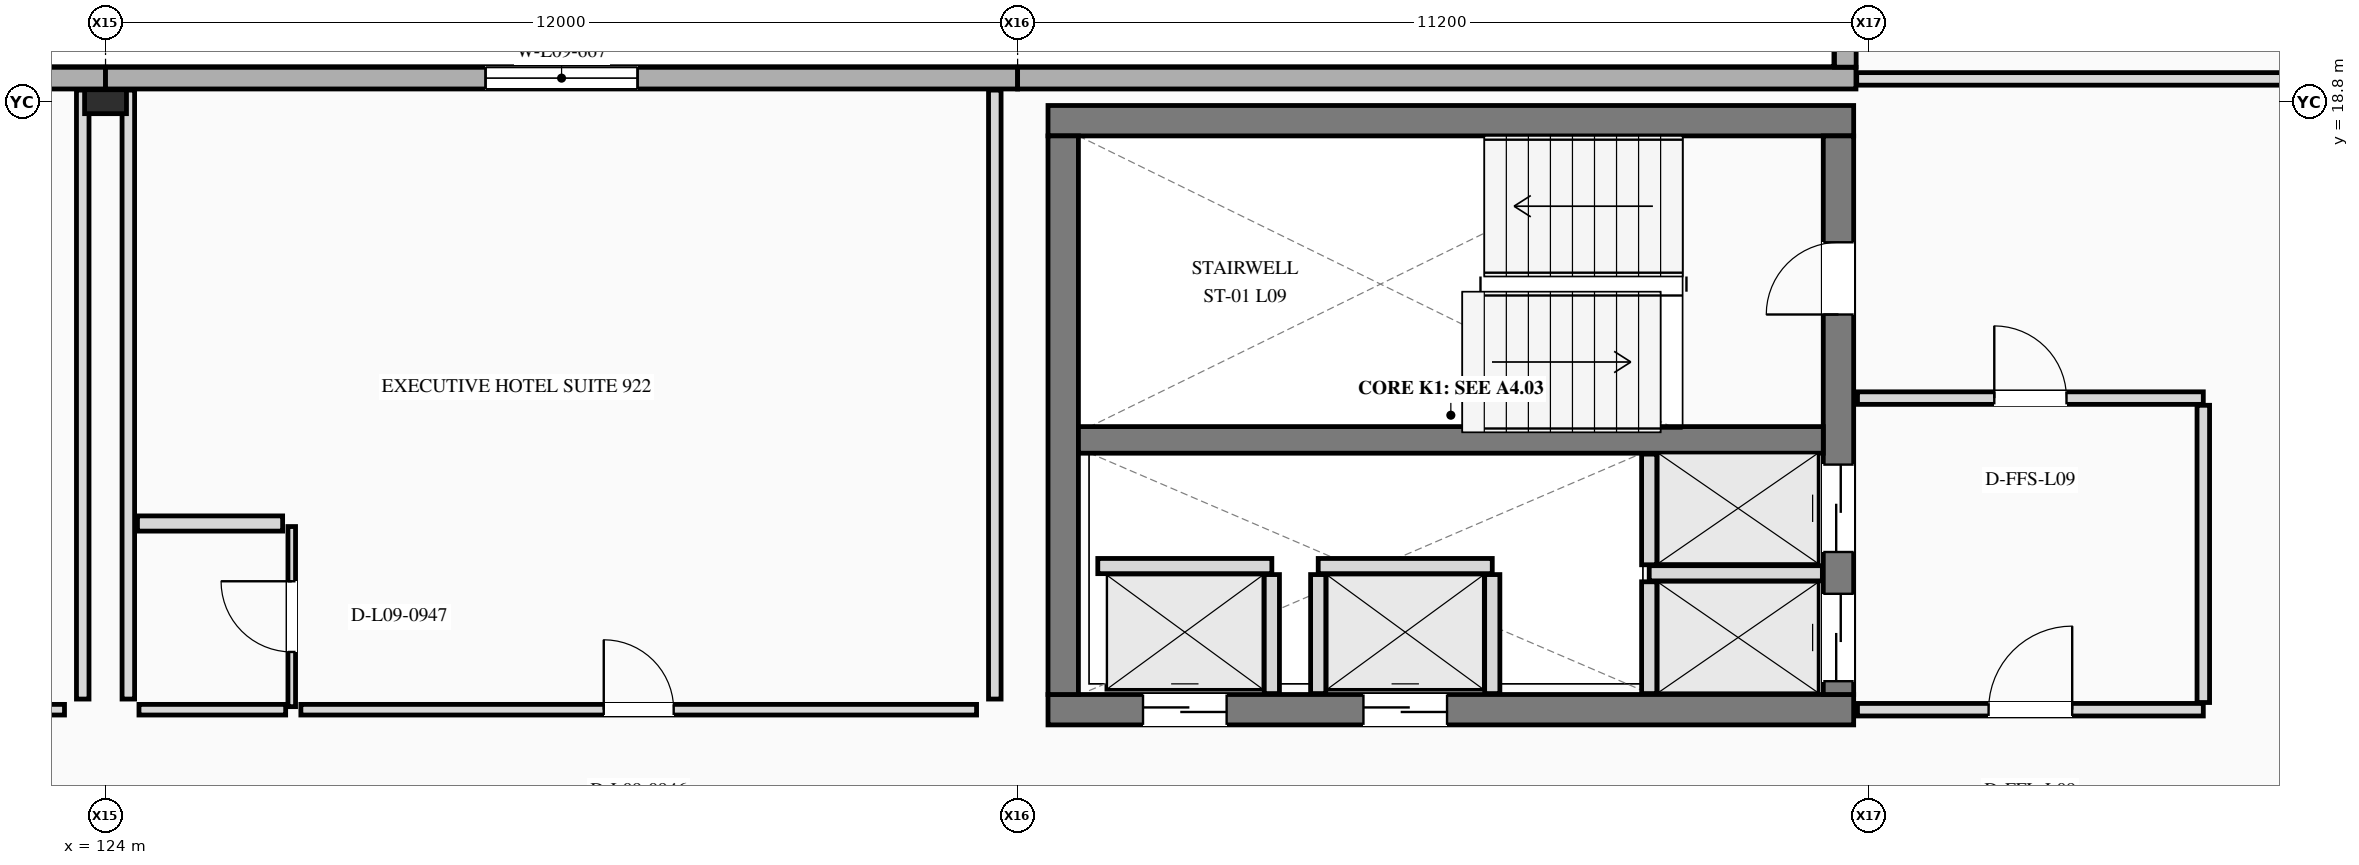
"""IFC4 building model, lengths in metres.
Left out: names, types, materials, properties, quantities, classifications, styles, units other than length and angle.
Written with IfcOpenShell. Run it as: python <this file> out.ifc"""

import sys

from ifc_helpers import new_model, si_unit, direction, frame, frame_2d, origin, origin_2d, place, context, subcontext, project, spatial, rectangle, i_section, extrude, element, fill, save


model = new_model("IFC4")
c1 = context("Model", 3, precision=1e-05, world=origin(), true_north=direction((0.0, 1.0)))
c2 = subcontext(c1, "Body", "Model", "MODEL_VIEW")
j1 = project(units=[si_unit("LENGTHUNIT", "METRE"), si_unit("PLANEANGLEUNIT", "RADIAN")], contexts=[c1])
p1 = place(None, origin())
s1 = spatial("IfcSite", under=j1, at=p1, CompositionType="ELEMENT")
p2 = place(p1, origin())
s2 = spatial("IfcBuilding", under=s1, at=p2, CompositionType="ELEMENT")
p3 = place(p2, frame((0.0, 0.0, 37.6)))
s3 = spatial("IfcBuildingStorey", under=s2, at=p3, CompositionType="ELEMENT", Elevation=37.6)
p4 = place(p3, frame((124.0, 18.8, 0.0), z_axis=(0.0, 0.0, 1.0), x_axis=(0.0, 1.0, 0.0)))
e1 = element("IfcColumn", 1, at=p4, inside=s3, PredefinedType="COLUMN", context=c2, shape_type="SweptSolid", body=[
    extrude(i_section(OverallWidth=0.315, OverallDepth=0.551, WebThickness=0.015, FlangeThickness=0.024, at=origin_2d()), origin(), (0.0, 0.0, 1.0), 3.5),
])
p5 = place(p3, frame((124.0, 19.11, 0.0), z_axis=(0.0, 0.0, 1.0), x_axis=(-1.0, 0.0, 0.0)))
e2 = element("IfcWall", 2, at=p5, inside=s3, PredefinedType="STANDARD", context=c2, shape_type="SweptSolid", body=[
    extrude(rectangle(XDim=12.0, YDim=0.285, at=frame_2d((6.0, 0.0))), origin(), (0.0, 0.0, 1.0), 3.5),
])
p6 = place(p5, frame((5.0, 0.0, 0.85)))
e3 = element("IfcOpeningElement", 3, at=p6, cuts=e2, PredefinedType="OPENING", context=c2, shape_type="SweptSolid", body=[
    extrude(rectangle(XDim=2.0, YDim=1.65, at=frame_2d((1.0, 0.825))), frame((0.0, 0.152, 0.0), z_axis=(0.0, -1.0, 0.0), x_axis=(1.0, 0.0, 0.0)), (0.0, 0.0, 1.0), 0.305),
])
p7 = place(p3, frame((136.0, 19.11, 0.0), z_axis=(0.0, 0.0, 1.0), x_axis=(-1.0, 0.0, 0.0)))
e4 = element("IfcWall", 4, at=p7, inside=s3, PredefinedType="STANDARD", context=c2, shape_type="SweptSolid", body=[
    extrude(rectangle(XDim=12.0, YDim=0.285, at=frame_2d((6.0, 0.0))), origin(), (0.0, 0.0, 1.0), 3.5),
])
p8 = place(p7, frame((5.0, 0.0, 0.85)))
e5 = element("IfcOpeningElement", 5, at=p8, cuts=e4, PredefinedType="OPENING", context=c2, shape_type="SweptSolid", body=[
    extrude(rectangle(XDim=2.0, YDim=1.65, at=frame_2d((1.0, 0.825))), frame((0.0, 0.152, 0.0), z_axis=(0.0, -1.0, 0.0), x_axis=(1.0, 0.0, 0.0)), (0.0, 0.0, 1.0), 0.305),
])
p9 = place(p3, frame((147.03, 19.11, 0.0), z_axis=(0.0, 0.0, 1.0), x_axis=(-1.0, 0.0, 0.0)))
e6 = element("IfcWall", 6, at=p9, inside=s3, PredefinedType="STANDARD", context=c2, shape_type="SweptSolid", body=[
    extrude(rectangle(XDim=11.03, YDim=0.285, at=frame_2d((5.515, 0.0))), origin(), (0.0, 0.0, 1.0), 3.5),
])
p10 = place(p3, frame((146.89, 19.254, 0.0), z_axis=(0.0, 0.0, 1.0), x_axis=(0.0, 1.0, 0.0)))
e7 = element("IfcWall", 7, at=p10, inside=s3, PredefinedType="STANDARD", context=c2, shape_type="SweptSolid", body=[
    extrude(rectangle(XDim=5.546, YDim=0.285, at=frame_2d((2.773, 0.0))), origin(), (0.0, 0.0, 1.0), 3.5),
])
p11 = place(p10, frame((1.598, 0.0, 0.85)))
e8 = element("IfcOpeningElement", 8, at=p11, cuts=e7, PredefinedType="OPENING", context=c2, shape_type="SweptSolid", body=[
    extrude(rectangle(XDim=2.0, YDim=1.65, at=frame_2d((1.0, 0.825))), frame((0.0, 0.152, 0.0), z_axis=(0.0, -1.0, 0.0), x_axis=(1.0, 0.0, 0.0)), (0.0, 0.0, 1.0), 0.305),
])
p12 = place(p3, frame((136.4, 10.8, 0.0), z_axis=(0.0, 0.0, 1.0), x_axis=(1.0, 0.0, 0.0)))
e9 = element("IfcWall", 9, at=p12, inside=s3, PredefinedType="SHEAR", context=c2, shape_type="SweptSolid", body=[
    extrude(rectangle(XDim=10.6, YDim=0.4, at=frame_2d((5.3, 0.0))), origin(), (0.0, 0.0, 1.0), 3.5),
])
p13 = place(p12, frame((1.25, 0.0, 0.0)))
e10 = element("IfcOpeningElement", 10, at=p13, cuts=e9, PredefinedType="OPENING", context=c2, shape_type="SweptSolid", body=[
    extrude(rectangle(XDim=1.1, YDim=2.2, at=frame_2d((0.55, 1.1))), frame((0.0, 0.21, 0.0), z_axis=(0.0, -1.0, 0.0), x_axis=(1.0, 0.0, 0.0)), (0.0, 0.0, 1.0), 0.42),
])
p14 = place(p12, frame((4.15, 0.0, 0.0)))
e11 = element("IfcOpeningElement", 11, at=p14, cuts=e9, PredefinedType="OPENING", context=c2, shape_type="SweptSolid", body=[
    extrude(rectangle(XDim=1.1, YDim=2.2, at=frame_2d((0.55, 1.1))), frame((0.0, 0.21, 0.0), z_axis=(0.0, -1.0, 0.0), x_axis=(1.0, 0.0, 0.0)), (0.0, 0.0, 1.0), 0.42),
])
p15 = place(p3, frame((147.0, 18.55, 0.0), z_axis=(0.0, 0.0, 1.0), x_axis=(-1.0, 0.0, 0.0)))
e12 = element("IfcWall", 12, at=p15, inside=s3, PredefinedType="SHEAR", context=c2, shape_type="SweptSolid", body=[
    extrude(rectangle(XDim=10.6, YDim=0.4, at=frame_2d((5.3, 0.0))), origin(), (0.0, 0.0, 1.0), 3.5),
])
p16 = place(p3, frame((136.6, 18.35, 0.0), z_axis=(0.0, 0.0, 1.0), x_axis=(0.0, -1.0, 0.0)))
e13 = element("IfcWall", 13, at=p16, inside=s3, PredefinedType="SHEAR", context=c2, shape_type="SweptSolid", body=[
    extrude(rectangle(XDim=7.35, YDim=0.4, at=frame_2d((3.675, 0.0))), origin(), (0.0, 0.0, 1.0), 3.5),
])
p17 = place(p3, frame((146.8, 11.0, 0.0), z_axis=(0.0, 0.0, 1.0), x_axis=(0.0, 1.0, 0.0)))
e14 = element("IfcWall", 14, at=p17, inside=s3, PredefinedType="SHEAR", context=c2, shape_type="SweptSolid", body=[
    extrude(rectangle(XDim=7.35, YDim=0.4, at=frame_2d((3.675, 0.0))), origin(), (0.0, 0.0, 1.0), 3.5),
])
p18 = place(p17, frame((5.0, 0.0, 0.0)))
e15 = element("IfcOpeningElement", 15, at=p18, cuts=e14, PredefinedType="OPENING", context=c2, shape_type="SweptSolid", body=[
    extrude(rectangle(XDim=0.95, YDim=2.2, at=frame_2d((0.475, 1.1))), frame((0.0, 0.21, 0.0), z_axis=(0.0, -1.0, 0.0), x_axis=(1.0, 0.0, 0.0)), (0.0, 0.0, 1.0), 0.42),
])
p19 = place(p17, frame((0.175, 0.0, 0.0)))
e16 = element("IfcOpeningElement", 16, at=p19, cuts=e14, PredefinedType="OPENING", context=c2, shape_type="SweptSolid", body=[
    extrude(rectangle(XDim=1.15, YDim=2.25, at=frame_2d((0.575, 1.125))), frame((0.0, 0.21, 0.0), z_axis=(0.0, -1.0, 0.0), x_axis=(1.0, 0.0, 0.0)), (0.0, 0.0, 1.0), 0.42),
])
p20 = place(p17, frame((1.875, 0.0, 0.0)))
e17 = element("IfcOpeningElement", 17, at=p20, cuts=e14, PredefinedType="OPENING", context=c2, shape_type="SweptSolid", body=[
    extrude(rectangle(XDim=1.15, YDim=2.25, at=frame_2d((0.575, 1.125))), frame((0.0, 0.21, 0.0), z_axis=(0.0, -1.0, 0.0), x_axis=(1.0, 0.0, 0.0)), (0.0, 0.0, 1.0), 0.42),
])
p21 = place(p3, frame((136.8, 14.35, 0.0), z_axis=(0.0, 0.0, 1.0), x_axis=(1.0, 0.0, 0.0)))
e18 = element("IfcWall", 18, at=p21, inside=s3, PredefinedType="SHEAR", context=c2, shape_type="SweptSolid", body=[
    extrude(rectangle(XDim=9.8, YDim=0.35, at=frame_2d((4.9, 0.0))), origin(), (0.0, 0.0, 1.0), 3.5),
])
p22 = place(p3, frame((137.055, 12.69, 0.0), z_axis=(0.0, 0.0, 1.0), x_axis=(1.0, 0.0, 0.0)))
e19 = element("IfcWall", 19, at=p22, inside=s3, PredefinedType="PLUMBINGWALL", context=c2, shape_type="SweptSolid", body=[
    extrude(rectangle(XDim=2.29, YDim=0.2, at=frame_2d((1.145, 0.0))), origin(), (0.0, 0.0, 1.0), 3.2),
])
p23 = place(p3, frame((139.345, 11.012, 0.0), z_axis=(0.0, 0.0, 1.0), x_axis=(0.0, 1.0, 0.0)))
e20 = element("IfcWall", 20, at=p23, inside=s3, PredefinedType="PLUMBINGWALL", context=c2, shape_type="SweptSolid", body=[
    extrude(rectangle(XDim=1.566, YDim=0.2, at=frame_2d((0.783, 0.0))), origin(), (0.0, 0.0, 1.0), 3.2),
])
p24 = place(p3, frame((139.955, 12.69, 0.0), z_axis=(0.0, 0.0, 1.0), x_axis=(1.0, 0.0, 0.0)))
e21 = element("IfcWall", 21, at=p24, inside=s3, PredefinedType="PLUMBINGWALL", context=c2, shape_type="SweptSolid", body=[
    extrude(rectangle(XDim=2.29, YDim=0.2, at=frame_2d((1.145, 0.0))), origin(), (0.0, 0.0, 1.0), 3.2),
])
for number, where, z_axis, x_axis in (
    (22, (139.955, 11.012, 0.0), (0.0, 0.0, 1.0), (0.0, 1.0, 0.0)),
    (23, (142.245, 11.012, 0.0), (0.0, 0.0, 1.0), (0.0, 1.0, 0.0)),
):
    element("IfcWall", number, at=place(p3, frame(where, z_axis=z_axis, x_axis=x_axis)), inside=s3, PredefinedType="PLUMBINGWALL", context=c2, shape_type="SweptSolid", body=[
        extrude(rectangle(XDim=1.566, YDim=0.2, at=frame_2d((0.783, 0.0))), origin(), (0.0, 0.0, 1.0), 3.2),
    ])
p25 = place(p3, frame((144.31, 12.595, 0.0), z_axis=(0.0, 0.0, 1.0), x_axis=(1.0, 0.0, 0.0)))
e24 = element("IfcWall", 24, at=p25, inside=s3, PredefinedType="PLUMBINGWALL", context=c2, shape_type="SweptSolid", body=[
    extrude(rectangle(XDim=2.278, YDim=0.2, at=frame_2d((1.139, 0.0))), origin(), (0.0, 0.0, 1.0), 3.2),
])
p26 = place(p3, frame((144.31, 11.012, 0.0), z_axis=(0.0, 0.0, 1.0), x_axis=(0.0, 1.0, 0.0)))
e25 = element("IfcWall", 25, at=p26, inside=s3, PredefinedType="PLUMBINGWALL", context=c2, shape_type="SweptSolid", body=[
    extrude(rectangle(XDim=1.471, YDim=0.2, at=frame_2d((0.735, 0.0))), origin(), (0.0, 0.0, 1.0), 3.2),
])
p27 = place(p3, frame((144.31, 12.707, 0.0), z_axis=(0.0, 0.0, 1.0), x_axis=(0.0, 1.0, 0.0)))
e26 = element("IfcWall", 26, at=p27, inside=s3, PredefinedType="PLUMBINGWALL", context=c2, shape_type="SweptSolid", body=[
    extrude(rectangle(XDim=1.456, YDim=0.2, at=frame_2d((0.728, 0.0))), origin(), (0.0, 0.0, 1.0), 3.2),
])
p28 = place(p3, frame((147.05, 10.8, 0.0), z_axis=(0.0, 0.0, 1.0), x_axis=(1.0, 0.0, 0.0)))
e27 = element("IfcWall", 27, at=p28, inside=s3, PredefinedType="PARTITIONING", context=c2, shape_type="SweptSolid", body=[
    extrude(rectangle(XDim=4.55, YDim=0.165, at=frame_2d((2.275, 0.0))), origin(), (0.0, 0.0, 1.0), 3.2),
])
p29 = place(p28, frame((1.725, 0.0, 0.0)))
e28 = element("IfcOpeningElement", 28, at=p29, cuts=e27, PredefinedType="OPENING", context=c2, shape_type="SweptSolid", body=[
    extrude(rectangle(XDim=1.1, YDim=2.2, at=frame_2d((0.55, 1.1))), frame((0.0, 0.093, 0.0), z_axis=(0.0, -1.0, 0.0), x_axis=(1.0, 0.0, 0.0)), (0.0, 0.0, 1.0), 0.185),
])
p30 = place(p3, frame((147.05, 14.9, 0.0), z_axis=(0.0, 0.0, 1.0), x_axis=(1.0, 0.0, 0.0)))
e29 = element("IfcWall", 29, at=p30, inside=s3, PredefinedType="PARTITIONING", context=c2, shape_type="SweptSolid", body=[
    extrude(rectangle(XDim=4.55, YDim=0.165, at=frame_2d((2.275, 0.0))), origin(), (0.0, 0.0, 1.0), 3.2),
])
p31 = place(p30, frame((1.8, 0.0, 0.0)))
e30 = element("IfcOpeningElement", 30, at=p31, cuts=e29, PredefinedType="OPENING", context=c2, shape_type="SweptSolid", body=[
    extrude(rectangle(XDim=0.95, YDim=2.2, at=frame_2d((0.475, 1.1))), frame((0.0, 0.093, 0.0), z_axis=(0.0, -1.0, 0.0), x_axis=(1.0, 0.0, 0.0)), (0.0, 0.0, 1.0), 0.185),
])
p32 = place(p3, frame((151.6, 10.895, 0.0), z_axis=(0.0, 0.0, 1.0), x_axis=(0.0, 1.0, 0.0)))
e31 = element("IfcWall", 31, at=p32, inside=s3, PredefinedType="PARTITIONING", context=c2, shape_type="SweptSolid", body=[
    extrude(rectangle(XDim=3.911, YDim=0.165, at=frame_2d((1.956, 0.0))), origin(), (0.0, 0.0, 1.0), 3.2),
])
p33 = place(p3, frame((114.57, 10.8, 0.0), z_axis=(0.0, 0.0, 1.0), x_axis=(1.0, 0.0, 0.0)))
e32 = element("IfcWall", 32, at=p33, inside=s3, PredefinedType="PARTITIONING", context=c2, shape_type="SweptSolid", body=[
    extrude(rectangle(XDim=8.89, YDim=0.14, at=frame_2d((4.445, 0.0))), origin(), (0.0, 0.0, 1.0), 3.2),
])
p34 = place(p33, frame((3.925, 0.0, 0.0)))
e33 = element("IfcOpeningElement", 33, at=p34, cuts=e32, PredefinedType="OPENING", context=c2, shape_type="SweptSolid", body=[
    extrude(rectangle(XDim=1.04, YDim=2.25, at=frame_2d((0.52, 1.125))), frame((0.0, 0.08, 0.0), z_axis=(0.0, -1.0, 0.0), x_axis=(1.0, 0.0, 0.0)), (0.0, 0.0, 1.0), 0.16),
])
p35 = place(p3, frame((123.7, 10.94, 0.0), z_axis=(0.0, 0.0, 1.0), x_axis=(0.0, 1.0, 0.0)))
e34 = element("IfcWall", 34, at=p35, inside=s3, PredefinedType="PARTITIONING", context=c2, shape_type="SweptSolid", body=[
    extrude(rectangle(XDim=8.012, YDim=0.165, at=frame_2d((4.006, 0.0))), origin(), (0.0, 0.0, 1.0), 2.438),
])
p36 = place(p3, frame((124.44, 10.8, 0.0), z_axis=(0.0, 0.0, 1.0), x_axis=(1.0, 0.0, 0.0)))
e35 = element("IfcWall", 35, at=p36, inside=s3, PredefinedType="PARTITIONING", context=c2, shape_type="SweptSolid", body=[
    extrude(rectangle(XDim=1.93, YDim=0.14, at=frame_2d((0.965, 0.0))), origin(), (0.0, 0.0, 1.0), 3.2),
])
p37 = place(p3, frame((126.57, 10.8, 0.0), z_axis=(0.0, 0.0, 1.0), x_axis=(1.0, 0.0, 0.0)))
e36 = element("IfcWall", 36, at=p37, inside=s3, PredefinedType="PARTITIONING", context=c2, shape_type="SweptSolid", body=[
    extrude(rectangle(XDim=8.89, YDim=0.14, at=frame_2d((4.445, 0.0))), origin(), (0.0, 0.0, 1.0), 3.2),
])
p38 = place(p37, frame((3.985, 0.0, 0.0)))
e37 = element("IfcOpeningElement", 37, at=p38, cuts=e36, PredefinedType="OPENING", context=c2, shape_type="SweptSolid", body=[
    extrude(rectangle(XDim=0.92, YDim=2.3, at=frame_2d((0.46, 1.15))), frame((0.0, 0.08, 0.0), z_axis=(0.0, -1.0, 0.0), x_axis=(1.0, 0.0, 0.0)), (0.0, 0.0, 1.0), 0.16),
])
p39 = place(p3, frame((124.3, 10.94, 0.0), z_axis=(0.0, 0.0, 1.0), x_axis=(0.0, 1.0, 0.0)))
e38 = element("IfcWall", 38, at=p39, inside=s3, PredefinedType="PARTITIONING", context=c2, shape_type="SweptSolid", body=[
    extrude(rectangle(XDim=8.012, YDim=0.165, at=frame_2d((4.006, 0.0))), origin(), (0.0, 0.0, 1.0), 2.529),
])
p40 = place(p3, frame((135.7, 10.94, 0.0), z_axis=(0.0, 0.0, 1.0), x_axis=(0.0, 1.0, 0.0)))
e39 = element("IfcWall", 39, at=p40, inside=s3, PredefinedType="PARTITIONING", context=c2, shape_type="SweptSolid", body=[
    extrude(rectangle(XDim=8.012, YDim=0.165, at=frame_2d((4.006, 0.0))), origin(), (0.0, 0.0, 1.0), 3.2),
])
p41 = place(p3, frame((126.45, 10.84, 0.0), z_axis=(0.0, 0.0, 1.0), x_axis=(0.0, 1.0, 0.0)))
e40 = element("IfcWall", 40, at=p41, inside=s3, PredefinedType="PARTITIONING", context=c2, shape_type="SweptSolid", body=[
    extrude(rectangle(XDim=2.37, YDim=0.1, at=frame_2d((1.185, 0.0))), origin(), (0.0, 0.0, 1.0), 3.2),
])
p42 = place(p41, frame((0.72, 0.0, 0.0)))
e41 = element("IfcOpeningElement", 41, at=p42, cuts=e40, PredefinedType="OPENING", context=c2, shape_type="SweptSolid", body=[
    extrude(rectangle(XDim=0.93, YDim=2.22, at=frame_2d((0.465, 1.11))), frame((0.0, 0.06, 0.0), z_axis=(0.0, -1.0, 0.0), x_axis=(1.0, 0.0, 0.0)), (0.0, 0.0, 1.0), 0.12),
])
p43 = place(p3, frame((124.42, 13.25, 0.0), z_axis=(0.0, 0.0, 1.0), x_axis=(1.0, 0.0, 0.0)))
e42 = element("IfcWall", 42, at=p43, inside=s3, PredefinedType="PLUMBINGWALL", context=c2, shape_type="SweptSolid", body=[
    extrude(rectangle(XDim=1.91, YDim=0.2, at=frame_2d((0.955, 0.0))), origin(), (0.0, 0.0, 1.0), 3.2),
])
p44 = place(p3, frame((147.04, 19.1, 0.0), z_axis=(0.0, 0.0, 1.0), x_axis=(1.0, 0.0, 0.0)))
e43 = element("IfcWall", 43, at=p44, inside=s3, PredefinedType="PARTITIONING", context=c2, shape_type="SweptSolid", body=[
    extrude(rectangle(XDim=8.22, YDim=0.165, at=frame_2d((4.11, 0.0))), origin(), (0.0, 0.0, 1.0), 3.2),
])
p45 = place(p8, origin())
e44 = element("IfcWindow", 44, at=p45, inside=s3, PartitioningType="SINGLE_PANEL", PredefinedType="WINDOW", context=c2, shape_type="SweptSolid", body=[
    extrude(rectangle(XDim=2.0, YDim=1.65, at=frame_2d((1.0, 0.825))), frame((0.0, 0.03, 0.0), z_axis=(0.0, -1.0, 0.0), x_axis=(1.0, 0.0, 0.0)), (0.0, 0.0, 1.0), 0.06),
])
fill(e5, e44)
p46 = place(p18, origin())
e45 = element("IfcDoor", 45, at=p46, inside=s3, OperationType="SINGLE_SWING_LEFT", PredefinedType="DOOR", context=c2, shape_type="SweptSolid", body=[
    extrude(rectangle(XDim=0.95, YDim=2.2, at=frame_2d((0.475, 1.1))), frame((0.0, 0.025, 0.0), z_axis=(0.0, -1.0, 0.0), x_axis=(1.0, 0.0, 0.0)), (0.0, 0.0, 1.0), 0.05),
])
fill(e15, e45)
p47 = place(p13, origin())
e46 = element("IfcDoor", 46, at=p47, inside=s3, OperationType="SLIDING_TO_LEFT", PredefinedType="DOOR", context=c2, shape_type="SweptSolid", body=[
    extrude(rectangle(XDim=1.1, YDim=2.2, at=frame_2d((0.55, 1.1))), frame((0.0, 0.025, 0.0), z_axis=(0.0, -1.0, 0.0), x_axis=(1.0, 0.0, 0.0)), (0.0, 0.0, 1.0), 0.05),
])
fill(e10, e46)
p48 = place(p14, origin())
e47 = element("IfcDoor", 47, at=p48, inside=s3, OperationType="SLIDING_TO_RIGHT", PredefinedType="DOOR", context=c2, shape_type="SweptSolid", body=[
    extrude(rectangle(XDim=1.1, YDim=2.2, at=frame_2d((0.55, 1.1))), frame((0.0, 0.025, 0.0), z_axis=(0.0, -1.0, 0.0), x_axis=(1.0, 0.0, 0.0)), (0.0, 0.0, 1.0), 0.05),
])
fill(e11, e47)
p49 = place(p19, origin())
e48 = element("IfcDoor", 48, at=p49, inside=s3, OperationType="SLIDING_TO_LEFT", PredefinedType="DOOR", context=c2, shape_type="SweptSolid", body=[
    extrude(rectangle(XDim=1.15, YDim=2.25, at=frame_2d((0.575, 1.125))), frame((0.0, 0.025, 0.0), z_axis=(0.0, -1.0, 0.0), x_axis=(1.0, 0.0, 0.0)), (0.0, 0.0, 1.0), 0.05),
])
fill(e16, e48)
p50 = place(p20, origin())
e49 = element("IfcDoor", 49, at=p50, inside=s3, OperationType="SLIDING_TO_RIGHT", PredefinedType="DOOR", context=c2, shape_type="SweptSolid", body=[
    extrude(rectangle(XDim=1.15, YDim=2.25, at=frame_2d((0.575, 1.125))), frame((0.0, 0.025, 0.0), z_axis=(0.0, -1.0, 0.0), x_axis=(1.0, 0.0, 0.0)), (0.0, 0.0, 1.0), 0.05),
])
fill(e17, e49)
p51 = place(p29, origin())
e50 = element("IfcDoor", 50, at=p51, inside=s3, OperationType="SINGLE_SWING_RIGHT", PredefinedType="DOOR", context=c2, shape_type="SweptSolid", body=[
    extrude(rectangle(XDim=1.1, YDim=2.2, at=frame_2d((0.55, 1.1))), frame((0.0, 0.025, 0.0), z_axis=(0.0, -1.0, 0.0), x_axis=(1.0, 0.0, 0.0)), (0.0, 0.0, 1.0), 0.05),
])
fill(e28, e50)
p52 = place(p31, origin())
e51 = element("IfcDoor", 51, at=p52, inside=s3, OperationType="SINGLE_SWING_LEFT", PredefinedType="DOOR", context=c2, shape_type="SweptSolid", body=[
    extrude(rectangle(XDim=0.95, YDim=2.2, at=frame_2d((0.475, 1.1))), frame((0.0, 0.025, 0.0), z_axis=(0.0, -1.0, 0.0), x_axis=(1.0, 0.0, 0.0)), (0.0, 0.0, 1.0), 0.05),
])
fill(e30, e51)
p53 = place(p38, origin())
e52 = element("IfcDoor", 52, at=p53, inside=s3, OperationType="SINGLE_SWING_LEFT", PredefinedType="DOOR", context=c2, shape_type="SweptSolid", body=[
    extrude(rectangle(XDim=0.92, YDim=2.3, at=frame_2d((0.46, 1.15))), frame((0.0, 0.025, 0.0), z_axis=(0.0, -1.0, 0.0), x_axis=(1.0, 0.0, 0.0)), (0.0, 0.0, 1.0), 0.05),
])
fill(e37, e52)
p54 = place(p42, origin())
e53 = element("IfcDoor", 53, at=p54, inside=s3, OperationType="SINGLE_SWING_RIGHT", PredefinedType="DOOR", context=c2, shape_type="SweptSolid", body=[
    extrude(rectangle(XDim=0.93, YDim=2.22, at=frame_2d((0.465, 1.11))), frame((0.0, 0.025, 0.0), z_axis=(0.0, -1.0, 0.0), x_axis=(1.0, 0.0, 0.0)), (0.0, 0.0, 1.0), 0.05),
])
fill(e41, e53)
save(model, sys.argv[1])
